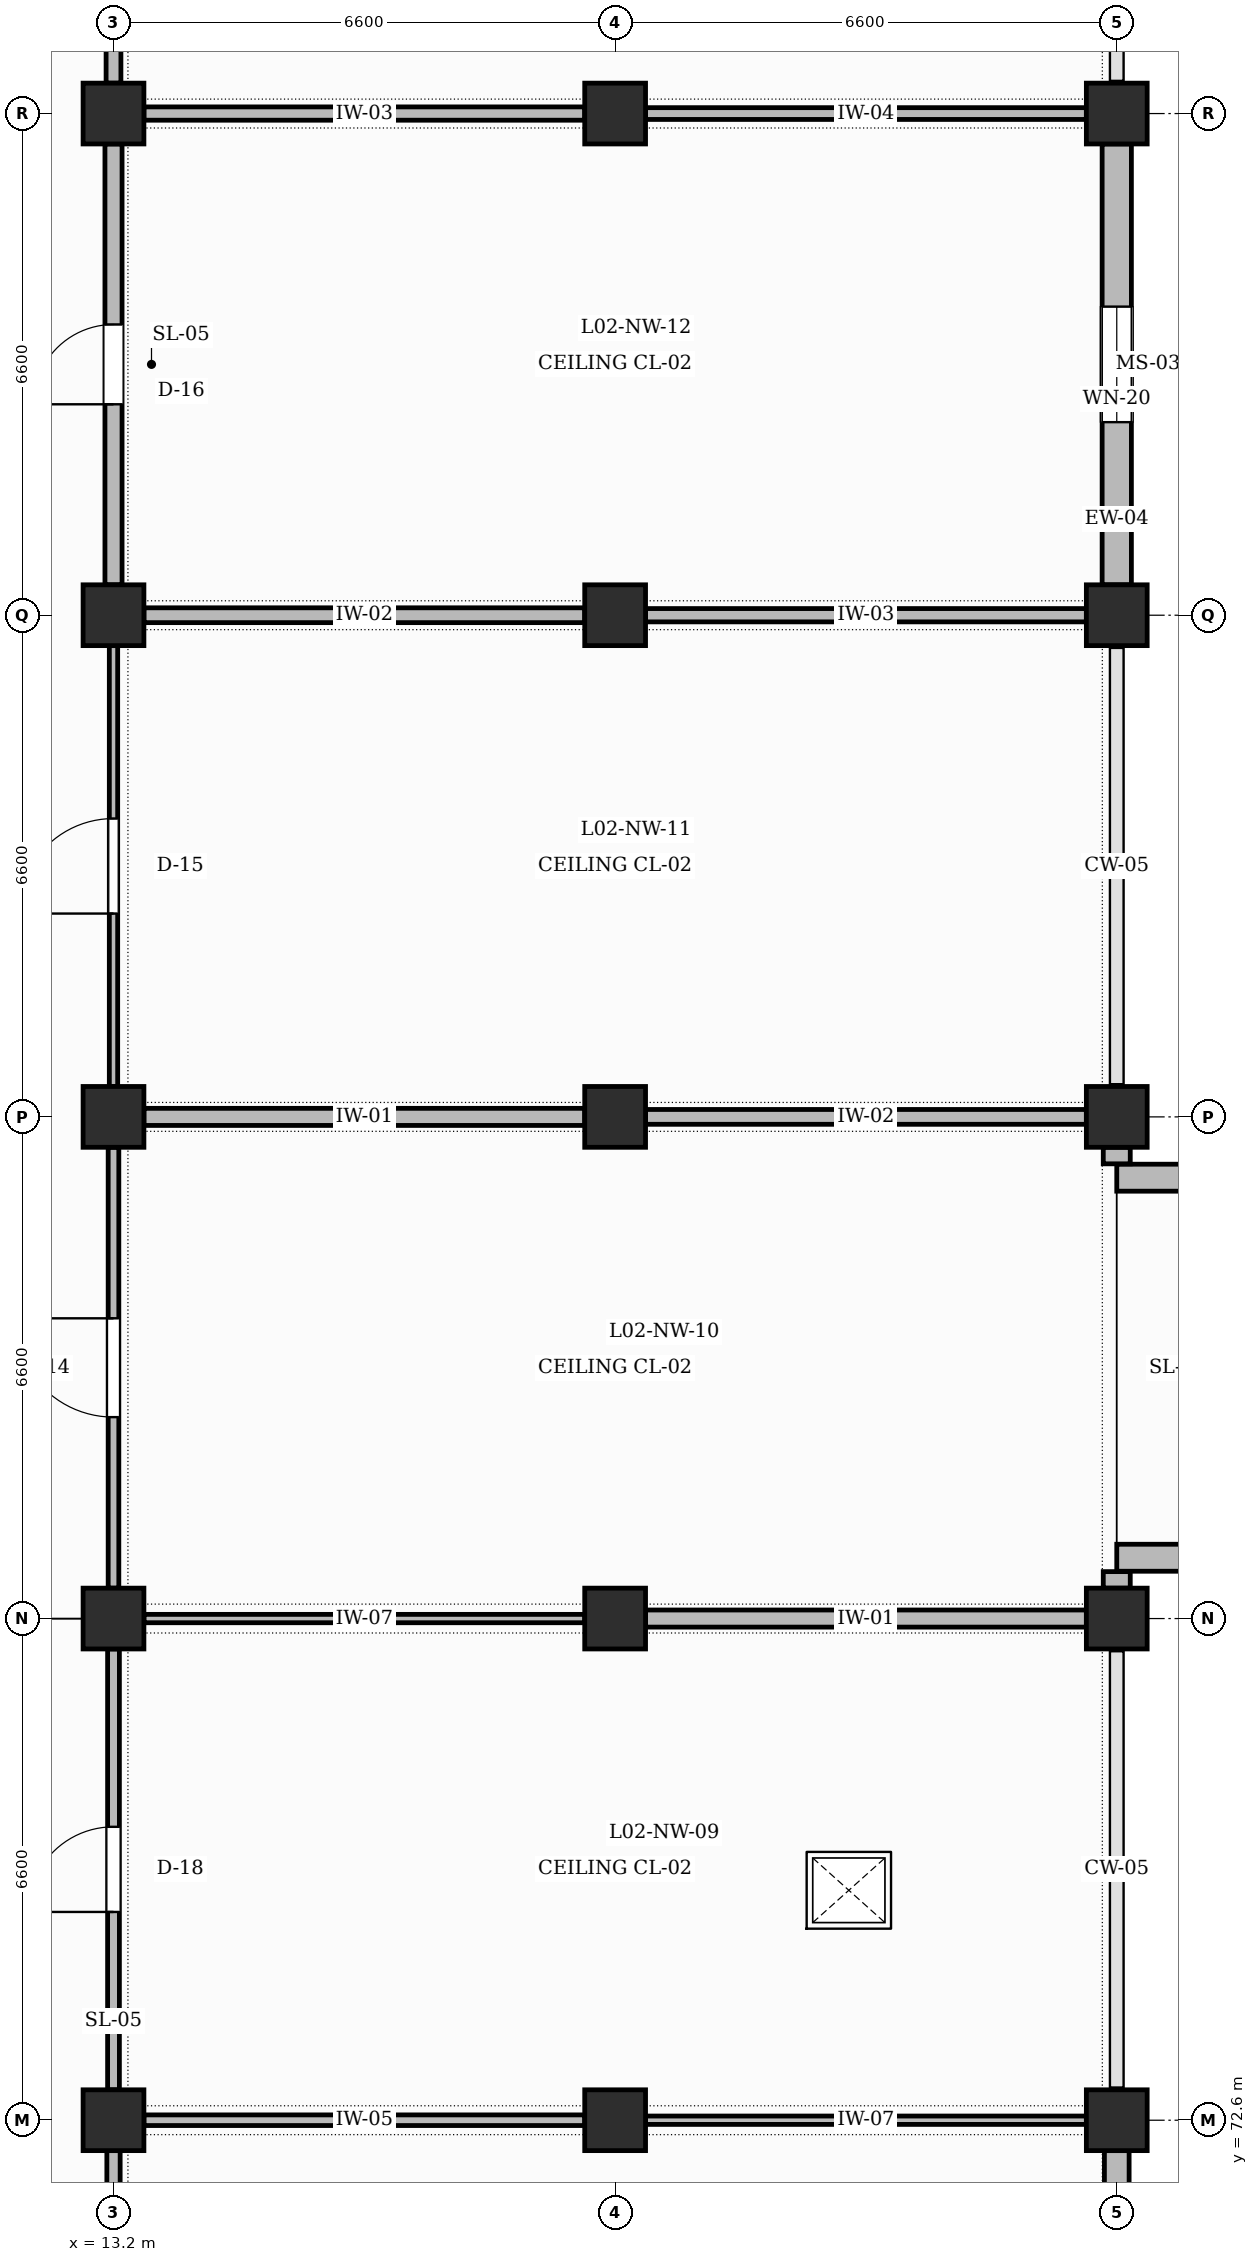
"""IFC4 building model, lengths in metres.
Left out: names, types, materials, properties, quantities, classifications, styles, units other than length and angle.
Written with IfcOpenShell. Run it as: python <this file> out.ifc"""

import sys

from ifc_helpers import new_model, si_unit, direction, frame, frame_2d, origin, origin_2d, place, context, subcontext, project, spatial, rectangle, extrude, element, fill, save


model = new_model("IFC4")
c1 = context("Model", 3, precision=1e-05, world=origin(), true_north=direction((0.0, 1.0)))
c2 = subcontext(c1, "Body", "Model", "MODEL_VIEW")
j1 = project(units=[si_unit("LENGTHUNIT", "METRE"), si_unit("PLANEANGLEUNIT", "RADIAN")], contexts=[c1])
p1 = place(None, origin())
s1 = spatial("IfcSite", under=j1, at=p1, CompositionType="ELEMENT")
p2 = place(p1, origin())
s2 = spatial("IfcBuilding", under=s1, at=p2, CompositionType="ELEMENT")
p3 = place(p2, frame((0.0, 0.0, 10.2)))
s3 = spatial("IfcBuildingStorey", under=s2, at=p3, CompositionType="ELEMENT", Elevation=10.2)
for number, where, z_axis, x_axis in (
    (1, (13.2, 72.6, 0.0), (0.0, 0.0, 1.0), (1.0, 0.0, 0.0)),
    (2, (13.2, 79.2, 0.0), (0.0, 0.0, 1.0), (1.0, 0.0, 0.0)),
    (3, (13.2, 85.8, 0.0), (0.0, 0.0, 1.0), (1.0, 0.0, 0.0)),
    (4, (13.2, 92.4, 0.0), (0.0, 0.0, 1.0), (1.0, 0.0, 0.0)),
    (5, (13.2, 99.0, 0.0), (0.0, 0.0, 1.0), (1.0, 0.0, 0.0)),
    (6, (19.8, 72.6, 0.0), (0.0, 0.0, 1.0), (1.0, 0.0, 0.0)),
    (7, (19.8, 79.2, 0.0), (0.0, 0.0, 1.0), (1.0, 0.0, 0.0)),
    (8, (19.8, 85.8, 0.0), (0.0, 0.0, 1.0), (1.0, 0.0, 0.0)),
    (9, (19.8, 92.4, 0.0), (0.0, 0.0, 1.0), (1.0, 0.0, 0.0)),
    (10, (19.8, 99.0, 0.0), (0.0, 0.0, 1.0), (1.0, 0.0, 0.0)),
    (11, (26.4, 72.6, 0.0), (0.0, 0.0, 1.0), (1.0, 0.0, 0.0)),
    (12, (26.4, 79.2, 0.0), (0.0, 0.0, 1.0), (1.0, 0.0, 0.0)),
    (13, (26.4, 85.8, 0.0), (0.0, 0.0, 1.0), (1.0, 0.0, 0.0)),
    (14, (26.4, 92.4, 0.0), (0.0, 0.0, 1.0), (1.0, 0.0, 0.0)),
    (15, (26.4, 99.0, 0.0), (0.0, 0.0, 1.0), (1.0, 0.0, 0.0)),
):
    element("IfcColumn", number, at=place(p3, frame(where, z_axis=z_axis, x_axis=x_axis)), inside=s3, PredefinedType="COLUMN", context=c2, shape_type="SweptSolid", body=[
        extrude(rectangle(XDim=0.8, YDim=0.8, at=origin_2d()), origin(), (0.0, 0.0, 1.0), 4.2),
    ])
p4 = place(p3, frame((26.4, 66.4, 0.0), z_axis=(0.0, 0.0, 1.0), x_axis=(0.0, 1.0, 0.0)))
e16 = element("IfcWall", 16, at=p4, inside=s3, PredefinedType="SOLIDWALL", context=c2, shape_type="SweptSolid", body=[
    extrude(rectangle(XDim=5.8, YDim=0.325, at=frame_2d((2.9, 0.0))), origin(), (0.0, 0.0, 1.0), 3.25),
])
p5 = place(p4, frame((2.14, 0.0, 0.95)))
e17 = element("IfcOpeningElement", 17, at=p5, cuts=e16, PredefinedType="OPENING", context=c2, shape_type="SweptSolid", body=[
    extrude(rectangle(XDim=1.52, YDim=1.74, at=frame_2d((0.76, 0.87))), frame((0.0, 0.172, 0.0), z_axis=(0.0, -1.0, 0.0), x_axis=(1.0, 0.0, 0.0)), (0.0, 0.0, 1.0), 0.345),
])
for number, where, z_axis, x_axis in (
    (18, (26.4, 79.6, 0.0), (0.0, 0.0, 1.0), (0.0, 1.0, 0.0)),
    (19, (26.4, 85.183, 0.0), (0.0, 0.0, 1.0), (0.0, 1.0, 0.0)),
):
    element("IfcWall", number, at=place(p3, frame(where, z_axis=z_axis, x_axis=x_axis)), inside=s3, PredefinedType="SOLIDWALL", context=c2, shape_type="SweptSolid", body=[
        extrude(rectangle(XDim=0.217, YDim=0.355, at=frame_2d((0.109, 0.0))), origin(), (0.0, 0.0, 1.0), 3.25),
    ])
for number, where, z_axis, x_axis in (
    (20, (26.4, 80.0, 0.0), (0.0, 0.0, 1.0), (1.0, 0.0, 0.0)),
    (21, (26.4, 85.0, 0.0), (0.0, 0.0, 1.0), (1.0, 0.0, 0.0)),
):
    element("IfcWall", number, at=place(p3, frame(where, z_axis=z_axis, x_axis=x_axis)), inside=s3, PredefinedType="SOLIDWALL", context=c2, shape_type="SweptSolid", body=[
        extrude(rectangle(XDim=1.6, YDim=0.355, at=frame_2d((0.8, 0.0))), origin(), (0.0, 0.0, 1.0), 3.25),
    ])
p6 = place(p3, frame((26.4, 92.8, 0.0), z_axis=(0.0, 0.0, 1.0), x_axis=(0.0, 1.0, 0.0)))
e22 = element("IfcWall", 22, at=p6, inside=s3, PredefinedType="SOLIDWALL", context=c2, shape_type="SweptSolid", body=[
    extrude(rectangle(XDim=5.8, YDim=0.385, at=frame_2d((2.9, 0.0))), origin(), (0.0, 0.0, 1.0), 3.25),
])
p7 = place(p6, frame((2.14, 0.0, 0.95)))
e23 = element("IfcOpeningElement", 23, at=p7, cuts=e22, PredefinedType="OPENING", context=c2, shape_type="SweptSolid", body=[
    extrude(rectangle(XDim=1.52, YDim=1.96, at=frame_2d((0.76, 0.98))), frame((0.0, 0.202, 0.0), z_axis=(0.0, -1.0, 0.0), x_axis=(1.0, 0.0, 0.0)), (0.0, 0.0, 1.0), 0.405),
])
p8 = place(p3, frame((13.2, 66.4, 0.0), z_axis=(0.0, 0.0, 1.0), x_axis=(0.0, 1.0, 0.0)))
e24 = element("IfcWall", 24, at=p8, inside=s3, PredefinedType="PARTITIONING", context=c2, shape_type="SweptSolid", body=[
    extrude(rectangle(XDim=5.8, YDim=0.175, at=frame_2d((2.9, 0.0))), origin(), (0.0, 0.0, 1.0), 3.1),
])
p9 = place(p8, frame((2.2, 0.0, 0.0)))
e25 = element("IfcOpeningElement", 25, at=p9, cuts=e24, PredefinedType="OPENING", context=c2, shape_type="SweptSolid", body=[
    extrude(rectangle(XDim=1.4, YDim=2.25, at=frame_2d((0.7, 1.125))), frame((0.0, 0.097, 0.0), z_axis=(0.0, -1.0, 0.0), x_axis=(1.0, 0.0, 0.0)), (0.0, 0.0, 1.0), 0.195),
])
p10 = place(p3, frame((13.2, 73.0, 0.0), z_axis=(0.0, 0.0, 1.0), x_axis=(0.0, 1.0, 0.0)))
e26 = element("IfcWall", 26, at=p10, inside=s3, PredefinedType="PARTITIONING", context=c2, shape_type="SweptSolid", body=[
    extrude(rectangle(XDim=5.8, YDim=0.155, at=frame_2d((2.9, 0.0))), origin(), (0.0, 0.0, 1.0), 3.1),
])
p11 = place(p10, frame((2.34, 0.0, 0.0)))
e27 = element("IfcOpeningElement", 27, at=p11, cuts=e26, PredefinedType="OPENING", context=c2, shape_type="SweptSolid", body=[
    extrude(rectangle(XDim=1.12, YDim=2.2, at=frame_2d((0.56, 1.1))), frame((0.0, 0.087, 0.0), z_axis=(0.0, -1.0, 0.0), x_axis=(1.0, 0.0, 0.0)), (0.0, 0.0, 1.0), 0.175),
])
p12 = place(p3, frame((13.2, 79.6, 0.0), z_axis=(0.0, 0.0, 1.0), x_axis=(0.0, 1.0, 0.0)))
e28 = element("IfcWall", 28, at=p12, inside=s3, PredefinedType="PARTITIONING", context=c2, shape_type="SweptSolid", body=[
    extrude(rectangle(XDim=5.8, YDim=0.14, at=frame_2d((2.9, 0.0))), origin(), (0.0, 0.0, 1.0), 3.1),
])
p13 = place(p12, frame((2.25, 0.0, 0.0)))
e29 = element("IfcOpeningElement", 29, at=p13, cuts=e28, PredefinedType="OPENING", context=c2, shape_type="SweptSolid", body=[
    extrude(rectangle(XDim=1.3, YDim=2.3, at=frame_2d((0.65, 1.15))), frame((0.0, 0.08, 0.0), z_axis=(0.0, -1.0, 0.0), x_axis=(1.0, 0.0, 0.0)), (0.0, 0.0, 1.0), 0.16),
])
p14 = place(p3, frame((13.2, 86.2, 0.0), z_axis=(0.0, 0.0, 1.0), x_axis=(0.0, 1.0, 0.0)))
e30 = element("IfcWall", 30, at=p14, inside=s3, PredefinedType="PARTITIONING", context=c2, shape_type="SweptSolid", body=[
    extrude(rectangle(XDim=5.8, YDim=0.11, at=frame_2d((2.9, 0.0))), origin(), (0.0, 0.0, 1.0), 3.1),
])
p15 = place(p14, frame((2.275, 0.0, 0.0)))
e31 = element("IfcOpeningElement", 31, at=p15, cuts=e30, PredefinedType="OPENING", context=c2, shape_type="SweptSolid", body=[
    extrude(rectangle(XDim=1.25, YDim=2.25, at=frame_2d((0.625, 1.125))), frame((0.0, 0.065, 0.0), z_axis=(0.0, -1.0, 0.0), x_axis=(1.0, 0.0, 0.0)), (0.0, 0.0, 1.0), 0.13),
])
p16 = place(p3, frame((13.2, 92.8, 0.0), z_axis=(0.0, 0.0, 1.0), x_axis=(0.0, 1.0, 0.0)))
e32 = element("IfcWall", 32, at=p16, inside=s3, PredefinedType="PARTITIONING", context=c2, shape_type="SweptSolid", body=[
    extrude(rectangle(XDim=5.8, YDim=0.225, at=frame_2d((2.9, 0.0))), origin(), (0.0, 0.0, 1.0), 3.1),
])
p17 = place(p16, frame((2.375, 0.0, 0.0)))
e33 = element("IfcOpeningElement", 33, at=p17, cuts=e32, PredefinedType="OPENING", context=c2, shape_type="SweptSolid", body=[
    extrude(rectangle(XDim=1.05, YDim=2.15, at=frame_2d((0.525, 1.075))), frame((0.0, 0.123, 0.0), z_axis=(0.0, -1.0, 0.0), x_axis=(1.0, 0.0, 0.0)), (0.0, 0.0, 1.0), 0.245),
])
p18 = place(p3, frame((13.2, 99.4, 0.0), z_axis=(0.0, 0.0, 1.0), x_axis=(0.0, 1.0, 0.0)))
e34 = element("IfcWall", 34, at=p18, inside=s3, PredefinedType="PARTITIONING", context=c2, shape_type="SweptSolid", body=[
    extrude(rectangle(XDim=5.8, YDim=0.195, at=frame_2d((2.9, 0.0))), origin(), (0.0, 0.0, 1.0), 3.1),
])
p19 = place(p18, frame((2.2, 0.0, 0.0)))
e35 = element("IfcOpeningElement", 35, at=p19, cuts=e34, PredefinedType="OPENING", context=c2, shape_type="SweptSolid", body=[
    extrude(rectangle(XDim=1.4, YDim=2.25, at=frame_2d((0.7, 1.125))), frame((0.0, 0.107, 0.0), z_axis=(0.0, -1.0, 0.0), x_axis=(1.0, 0.0, 0.0)), (0.0, 0.0, 1.0), 0.215),
])
p20 = place(p3, frame((13.6, 72.6, 0.0), z_axis=(0.0, 0.0, 1.0), x_axis=(1.0, 0.0, 0.0)))
e36 = element("IfcWall", 36, at=p20, inside=s3, PredefinedType="PARTITIONING", context=c2, shape_type="SweptSolid", body=[
    extrude(rectangle(XDim=5.8, YDim=0.14, at=frame_2d((2.9, 0.0))), origin(), (0.0, 0.0, 1.0), 3.1),
])
p21 = place(p3, frame((13.6, 79.2, 0.0), z_axis=(0.0, 0.0, 1.0), x_axis=(1.0, 0.0, 0.0)))
e37 = element("IfcWall", 37, at=p21, inside=s3, PredefinedType="PARTITIONING", context=c2, shape_type="SweptSolid", body=[
    extrude(rectangle(XDim=5.8, YDim=0.11, at=frame_2d((2.9, 0.0))), origin(), (0.0, 0.0, 1.0), 3.0),
])
p22 = place(p3, frame((13.6, 85.8, 0.0), z_axis=(0.0, 0.0, 1.0), x_axis=(1.0, 0.0, 0.0)))
e38 = element("IfcWall", 38, at=p22, inside=s3, PredefinedType="PARTITIONING", context=c2, shape_type="SweptSolid", body=[
    extrude(rectangle(XDim=5.8, YDim=0.225, at=frame_2d((2.9, 0.0))), origin(), (0.0, 0.0, 1.0), 3.1),
])
p23 = place(p3, frame((13.6, 92.4, 0.0), z_axis=(0.0, 0.0, 1.0), x_axis=(1.0, 0.0, 0.0)))
e39 = element("IfcWall", 39, at=p23, inside=s3, PredefinedType="PARTITIONING", context=c2, shape_type="SweptSolid", body=[
    extrude(rectangle(XDim=5.8, YDim=0.195, at=frame_2d((2.9, 0.0))), origin(), (0.0, 0.0, 1.0), 3.0),
])
p24 = place(p3, frame((13.6, 99.0, 0.0), z_axis=(0.0, 0.0, 1.0), x_axis=(1.0, 0.0, 0.0)))
e40 = element("IfcWall", 40, at=p24, inside=s3, PredefinedType="PARTITIONING", context=c2, shape_type="SweptSolid", body=[
    extrude(rectangle(XDim=5.8, YDim=0.175, at=frame_2d((2.9, 0.0))), origin(), (0.0, 0.0, 1.0), 3.1),
])
p25 = place(p3, frame((20.2, 72.6, 0.0), z_axis=(0.0, 0.0, 1.0), x_axis=(1.0, 0.0, 0.0)))
e41 = element("IfcWall", 41, at=p25, inside=s3, PredefinedType="PARTITIONING", context=c2, shape_type="SweptSolid", body=[
    extrude(rectangle(XDim=5.8, YDim=0.11, at=frame_2d((2.9, 0.0))), origin(), (0.0, 0.0, 1.0), 3.0),
])
p26 = place(p3, frame((20.2, 79.2, 0.0), z_axis=(0.0, 0.0, 1.0), x_axis=(1.0, 0.0, 0.0)))
e42 = element("IfcWall", 42, at=p26, inside=s3, PredefinedType="PARTITIONING", context=c2, shape_type="SweptSolid", body=[
    extrude(rectangle(XDim=5.8, YDim=0.225, at=frame_2d((2.9, 0.0))), origin(), (0.0, 0.0, 1.0), 3.4),
])
p27 = place(p3, frame((20.2, 85.8, 0.0), z_axis=(0.0, 0.0, 1.0), x_axis=(1.0, 0.0, 0.0)))
e43 = element("IfcWall", 43, at=p27, inside=s3, PredefinedType="PARTITIONING", context=c2, shape_type="SweptSolid", body=[
    extrude(rectangle(XDim=5.8, YDim=0.195, at=frame_2d((2.9, 0.0))), origin(), (0.0, 0.0, 1.0), 3.4),
])
p28 = place(p3, frame((20.2, 92.4, 0.0), z_axis=(0.0, 0.0, 1.0), x_axis=(1.0, 0.0, 0.0)))
e44 = element("IfcWall", 44, at=p28, inside=s3, PredefinedType="PARTITIONING", context=c2, shape_type="SweptSolid", body=[
    extrude(rectangle(XDim=5.8, YDim=0.175, at=frame_2d((2.9, 0.0))), origin(), (0.0, 0.0, 1.0), 3.1),
])
p29 = place(p3, frame((20.2, 99.0, 0.0), z_axis=(0.0, 0.0, 1.0), x_axis=(1.0, 0.0, 0.0)))
e45 = element("IfcWall", 45, at=p29, inside=s3, PredefinedType="PARTITIONING", context=c2, shape_type="SweptSolid", body=[
    extrude(rectangle(XDim=5.8, YDim=0.155, at=frame_2d((2.9, 0.0))), origin(), (0.0, 0.0, 1.0), 3.0),
])
p30 = place(p7, origin())
e46 = element("IfcWindow", 46, at=p30, inside=s3, PartitioningType="DOUBLE_PANEL_VERTICAL", PredefinedType="WINDOW", context=c2, shape_type="SweptSolid", body=[
    extrude(rectangle(XDim=1.52, YDim=1.96, at=frame_2d((0.76, 0.98))), frame((0.0, 0.03, 0.0), z_axis=(0.0, -1.0, 0.0), x_axis=(1.0, 0.0, 0.0)), (0.0, 0.0, 1.0), 0.06),
])
fill(e23, e46)
p31 = place(p11, origin())
e47 = element("IfcDoor", 47, at=p31, inside=s3, OperationType="SINGLE_SWING_LEFT", PredefinedType="DOOR", context=c2, shape_type="SweptSolid", body=[
    extrude(rectangle(XDim=1.12, YDim=2.2, at=frame_2d((0.56, 1.1))), frame((0.0, 0.025, 0.0), z_axis=(0.0, -1.0, 0.0), x_axis=(1.0, 0.0, 0.0)), (0.0, 0.0, 1.0), 0.05),
])
fill(e27, e47)
p32 = place(p13, origin())
e48 = element("IfcDoor", 48, at=p32, inside=s3, OperationType="SINGLE_SWING_RIGHT", PredefinedType="DOOR", context=c2, shape_type="SweptSolid", body=[
    extrude(rectangle(XDim=1.3, YDim=2.3, at=frame_2d((0.65, 1.15))), frame((0.0, 0.025, 0.0), z_axis=(0.0, -1.0, 0.0), x_axis=(1.0, 0.0, 0.0)), (0.0, 0.0, 1.0), 0.05),
])
fill(e29, e48)
p33 = place(p15, origin())
e49 = element("IfcDoor", 49, at=p33, inside=s3, OperationType="SINGLE_SWING_LEFT", PredefinedType="DOOR", context=c2, shape_type="SweptSolid", body=[
    extrude(rectangle(XDim=1.25, YDim=2.25, at=frame_2d((0.625, 1.125))), frame((0.0, 0.025, 0.0), z_axis=(0.0, -1.0, 0.0), x_axis=(1.0, 0.0, 0.0)), (0.0, 0.0, 1.0), 0.05),
])
fill(e31, e49)
p34 = place(p17, origin())
e50 = element("IfcDoor", 50, at=p34, inside=s3, OperationType="SINGLE_SWING_LEFT", PredefinedType="DOOR", context=c2, shape_type="SweptSolid", body=[
    extrude(rectangle(XDim=1.05, YDim=2.15, at=frame_2d((0.525, 1.075))), frame((0.0, 0.025, 0.0), z_axis=(0.0, -1.0, 0.0), x_axis=(1.0, 0.0, 0.0)), (0.0, 0.0, 1.0), 0.05),
])
fill(e33, e50)
save(model, sys.argv[1])
